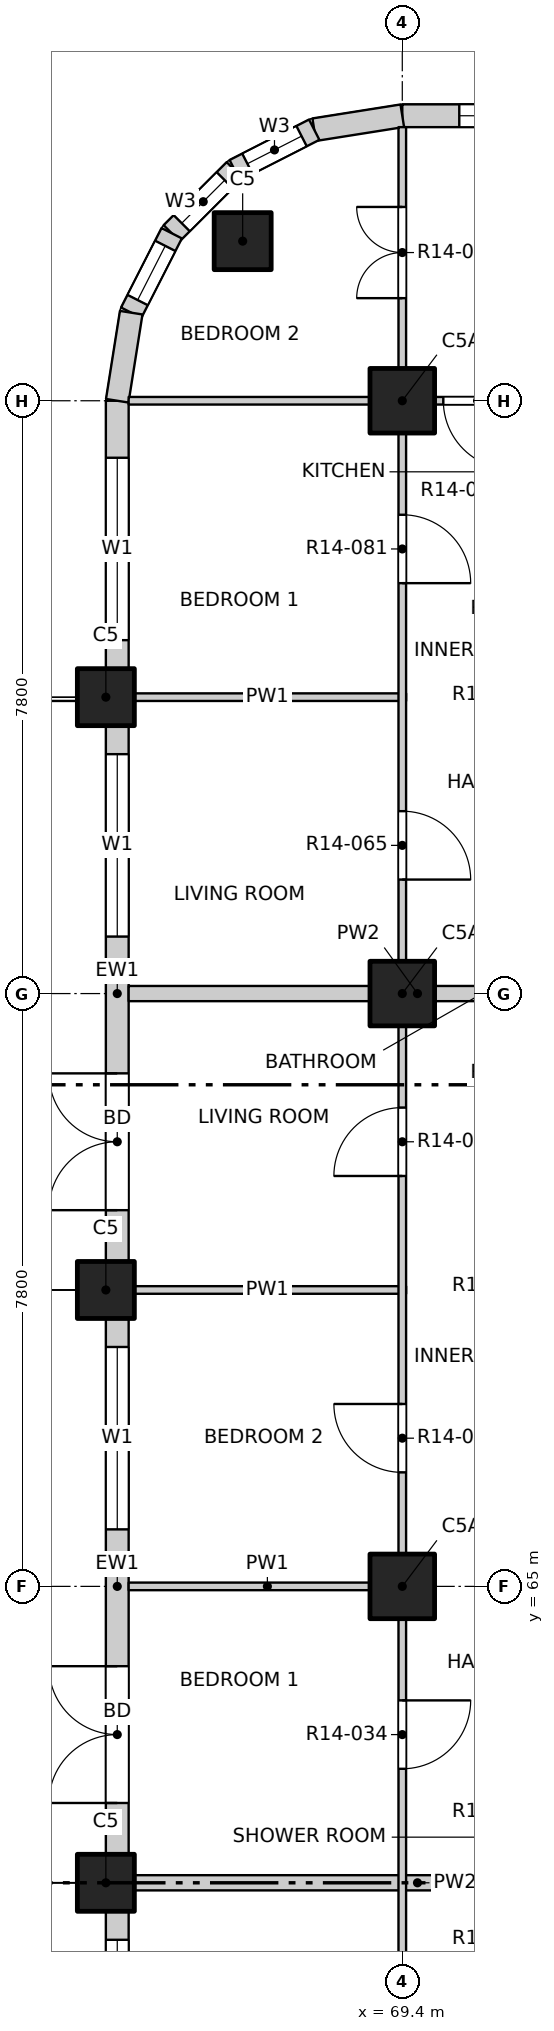
"""IFC4 building model, lengths in metres.
Left out: names, types, materials, properties, quantities, classifications, styles, units other than length and angle.
Written with IfcOpenShell. Run it as: python <this file> out.ifc"""

import sys

from ifc_helpers import new_model, si_unit, direction, frame, frame_2d, origin, origin_2d, place, context, subcontext, project, spatial, rectangle, extrude, element, fill, save


model = new_model("IFC4")
c1 = context("Model", 3, precision=1e-05, world=origin(), true_north=direction((0.0, 1.0)))
c2 = subcontext(c1, "Body", "Model", "MODEL_VIEW")
j1 = project(units=[si_unit("LENGTHUNIT", "METRE"), si_unit("PLANEANGLEUNIT", "RADIAN")], contexts=[c1])
p1 = place(None, origin())
s1 = spatial("IfcSite", under=j1, at=p1, CompositionType="ELEMENT")
p2 = place(p1, origin())
s2 = spatial("IfcBuilding", under=s1, at=p2, CompositionType="ELEMENT")
p3 = place(p2, frame((0.0, 0.0, 148.6)))
s3 = spatial("IfcBuildingStorey", under=s2, at=p3, CompositionType="ELEMENT", Elevation=148.6)
for number, where, z_axis, x_axis in (
    (1, (67.3, 82.7, -0.3), (0.0, 0.0, 1.0), (1.0, 0.0, 0.0)),
    (2, (65.5, 61.1, -0.3), (0.0, 0.0, 1.0), (1.0, 0.0, 0.0)),
    (3, (65.5, 68.9, -0.3), (0.0, 0.0, 1.0), (1.0, 0.0, 0.0)),
    (4, (65.5, 76.7, -0.3), (0.0, 0.0, 1.0), (1.0, 0.0, 0.0)),
):
    element("IfcColumn", number, at=place(p3, frame(where, z_axis=z_axis, x_axis=x_axis)), inside=s3, PredefinedType="COLUMN", context=c2, shape_type="SweptSolid", body=[
        extrude(rectangle(XDim=0.75, YDim=0.75, at=origin_2d()), origin(), (0.0, 0.0, 1.0), 3.45),
    ])
for number, where, z_axis, x_axis in (
    (5, (69.4, 65.0, -0.3), (0.0, 0.0, 1.0), (1.0, 0.0, 0.0)),
    (6, (69.4, 72.8, -0.3), (0.0, 0.0, 1.0), (1.0, 0.0, 0.0)),
    (7, (69.4, 80.6, -0.3), (0.0, 0.0, 1.0), (1.0, 0.0, 0.0)),
):
    element("IfcColumn", number, at=place(p3, frame(where, z_axis=z_axis, x_axis=x_axis)), inside=s3, PredefinedType="COLUMN", context=c2, shape_type="SweptSolid", body=[
        extrude(rectangle(XDim=0.85, YDim=0.85, at=origin_2d()), origin(), (0.0, 0.0, 1.0), 3.45),
    ])
p4 = place(p3, frame((69.4, 84.35, 0.0), z_axis=(0.0, 0.0, 1.0), x_axis=(1.0, 0.0, 0.0)))
e8 = element("IfcWall", 8, at=p4, inside=s3, PredefinedType="SOLIDWALL", context=c2, shape_type="SweptSolid", body=[
    extrude(rectangle(XDim=3.525, YDim=0.3, at=frame_2d((1.763, 0.0))), origin(), (0.0, 0.0, 1.0), 2.7),
])
p5 = place(p4, frame((0.75, 0.0, 0.9)))
e9 = element("IfcOpeningElement", 9, at=p5, cuts=e8, PredefinedType="OPENING", context=c2, shape_type="SweptSolid", body=[
    extrude(rectangle(XDim=2.4, YDim=1.8, at=frame_2d((1.2, 0.9))), frame((0.0, 0.16, 0.0), z_axis=(0.0, -1.0, 0.0), x_axis=(1.0, 0.0, 0.0)), (0.0, 0.0, 1.0), 0.32),
])
p6 = place(p3, frame((65.65, 53.675, 0.0), z_axis=(0.0, 0.0, 1.0), x_axis=(0.0, 1.0, 0.0)))
e10 = element("IfcWall", 10, at=p6, inside=s3, PredefinedType="SOLIDWALL", context=c2, shape_type="SweptSolid", body=[
    extrude(rectangle(XDim=7.05, YDim=0.3, at=frame_2d((3.525, 0.0))), origin(), (0.0, 0.0, 1.0), 2.7),
])
p7 = place(p6, frame((0.675, 0.0, 0.0)))
e11 = element("IfcOpeningElement", 11, at=p7, cuts=e10, PredefinedType="OPENING", context=c2, shape_type="SweptSolid", body=[
    extrude(rectangle(XDim=1.8, YDim=2.4, at=frame_2d((0.9, 1.2))), frame((0.0, 0.16, 0.0), z_axis=(0.0, -1.0, 0.0), x_axis=(1.0, 0.0, 0.0)), (0.0, 0.0, 1.0), 0.32),
])
p8 = place(p6, frame((4.275, 0.0, 0.9)))
e12 = element("IfcOpeningElement", 12, at=p8, cuts=e10, PredefinedType="OPENING", context=c2, shape_type="SweptSolid", body=[
    extrude(rectangle(XDim=2.4, YDim=1.8, at=frame_2d((1.2, 0.9))), frame((0.0, 0.16, 0.0), z_axis=(0.0, -1.0, 0.0), x_axis=(1.0, 0.0, 0.0)), (0.0, 0.0, 1.0), 0.32),
])
p9 = place(p3, frame((65.65, 61.475, 0.0), z_axis=(0.0, 0.0, 1.0), x_axis=(0.0, 1.0, 0.0)))
e13 = element("IfcWall", 13, at=p9, inside=s3, PredefinedType="SOLIDWALL", context=c2, shape_type="SweptSolid", body=[
    extrude(rectangle(XDim=7.05, YDim=0.3, at=frame_2d((3.525, 0.0))), origin(), (0.0, 0.0, 1.0), 2.7),
])
p10 = place(p9, frame((0.675, 0.0, 0.0)))
e14 = element("IfcOpeningElement", 14, at=p10, cuts=e13, PredefinedType="OPENING", context=c2, shape_type="SweptSolid", body=[
    extrude(rectangle(XDim=1.8, YDim=2.4, at=frame_2d((0.9, 1.2))), frame((0.0, 0.16, 0.0), z_axis=(0.0, -1.0, 0.0), x_axis=(1.0, 0.0, 0.0)), (0.0, 0.0, 1.0), 0.32),
])
p11 = place(p9, frame((4.275, 0.0, 0.9)))
e15 = element("IfcOpeningElement", 15, at=p11, cuts=e13, PredefinedType="OPENING", context=c2, shape_type="SweptSolid", body=[
    extrude(rectangle(XDim=2.4, YDim=1.8, at=frame_2d((1.2, 0.9))), frame((0.0, 0.16, 0.0), z_axis=(0.0, -1.0, 0.0), x_axis=(1.0, 0.0, 0.0)), (0.0, 0.0, 1.0), 0.32),
])
p12 = place(p3, frame((65.65, 69.275, 0.0), z_axis=(0.0, 0.0, 1.0), x_axis=(0.0, 1.0, 0.0)))
e16 = element("IfcWall", 16, at=p12, inside=s3, PredefinedType="SOLIDWALL", context=c2, shape_type="SweptSolid", body=[
    extrude(rectangle(XDim=7.05, YDim=0.3, at=frame_2d((3.525, 0.0))), origin(), (0.0, 0.0, 1.0), 2.7),
])
p13 = place(p12, frame((0.675, 0.0, 0.0)))
e17 = element("IfcOpeningElement", 17, at=p13, cuts=e16, PredefinedType="OPENING", context=c2, shape_type="SweptSolid", body=[
    extrude(rectangle(XDim=1.8, YDim=2.4, at=frame_2d((0.9, 1.2))), frame((0.0, 0.16, 0.0), z_axis=(0.0, -1.0, 0.0), x_axis=(1.0, 0.0, 0.0)), (0.0, 0.0, 1.0), 0.32),
])
p14 = place(p12, frame((4.275, 0.0, 0.9)))
e18 = element("IfcOpeningElement", 18, at=p14, cuts=e16, PredefinedType="OPENING", context=c2, shape_type="SweptSolid", body=[
    extrude(rectangle(XDim=2.4, YDim=1.8, at=frame_2d((1.2, 0.9))), frame((0.0, 0.16, 0.0), z_axis=(0.0, -1.0, 0.0), x_axis=(1.0, 0.0, 0.0)), (0.0, 0.0, 1.0), 0.32),
])
p15 = place(p3, frame((65.65, 77.075, 0.0), z_axis=(0.0, 0.0, 1.0), x_axis=(0.0, 1.0, 0.0)))
e19 = element("IfcWall", 19, at=p15, inside=s3, PredefinedType="SOLIDWALL", context=c2, shape_type="SweptSolid", body=[
    extrude(rectangle(XDim=3.525, YDim=0.3, at=frame_2d((1.763, 0.0))), origin(), (0.0, 0.0, 1.0), 2.7),
])
p16 = place(p15, frame((0.375, 0.0, 0.9)))
e20 = element("IfcOpeningElement", 20, at=p16, cuts=e19, PredefinedType="OPENING", context=c2, shape_type="SweptSolid", body=[
    extrude(rectangle(XDim=2.4, YDim=1.8, at=frame_2d((1.2, 0.9))), frame((0.0, 0.16, 0.0), z_axis=(0.0, -1.0, 0.0), x_axis=(1.0, 0.0, 0.0)), (0.0, 0.0, 1.0), 0.32),
])
p17 = place(p3, frame((69.4, 84.35, 0.0), z_axis=(0.0, 0.0, 1.0), x_axis=(-0.987678452879, -0.156496880861, 0.0)))
e21 = element("IfcWall", 21, at=p17, inside=s3, PredefinedType="SOLIDWALL", context=c2, shape_type="SweptSolid", body=[
    extrude(rectangle(XDim=1.173, YDim=0.3, at=frame_2d((0.586, 0.0))), origin(), (0.0, 0.0, 1.0), 2.7),
])
p18 = place(p3, frame((68.241, 84.167, 0.0), z_axis=(0.0, 0.0, 1.0), x_axis=(-0.890988677504, -0.454025524128, 0.0)))
e22 = element("IfcWall", 22, at=p18, inside=s3, PredefinedType="SOLIDWALL", context=c2, shape_type="SweptSolid", body=[
    extrude(rectangle(XDim=1.173, YDim=0.3, at=frame_2d((0.587, 0.0))), origin(), (0.0, 0.0, 1.0), 2.7),
])
p19 = place(p18, frame((0.187, 0.0, 0.9)))
e23 = element("IfcOpeningElement", 23, at=p19, cuts=e22, PredefinedType="OPENING", context=c2, shape_type="SweptSolid", body=[
    extrude(rectangle(XDim=0.8, YDim=1.2, at=frame_2d((0.4, 0.6))), frame((0.0, 0.16, 0.0), z_axis=(0.0, -1.0, 0.0), x_axis=(1.0, 0.0, 0.0)), (0.0, 0.0, 1.0), 0.32),
])
p20 = place(p3, frame((67.196, 83.634, 0.0), z_axis=(0.0, 0.0, 1.0), x_axis=(-0.707106781187, -0.707106781187, 0.0)))
e24 = element("IfcWall", 24, at=p20, inside=s3, PredefinedType="SOLIDWALL", context=c2, shape_type="SweptSolid", body=[
    extrude(rectangle(XDim=1.173, YDim=0.3, at=frame_2d((0.586, 0.0))), origin(), (0.0, 0.0, 1.0), 2.7),
])
p21 = place(p20, frame((0.187, 0.0, 0.9)))
e25 = element("IfcOpeningElement", 25, at=p21, cuts=e24, PredefinedType="OPENING", context=c2, shape_type="SweptSolid", body=[
    extrude(rectangle(XDim=0.8, YDim=1.2, at=frame_2d((0.4, 0.6))), frame((0.0, 0.16, 0.0), z_axis=(0.0, -1.0, 0.0), x_axis=(1.0, 0.0, 0.0)), (0.0, 0.0, 1.0), 0.32),
])
p22 = place(p3, frame((66.366, 82.804, 0.0), z_axis=(0.0, 0.0, 1.0), x_axis=(-0.454025524128, -0.890988677504, 0.0)))
e26 = element("IfcWall", 26, at=p22, inside=s3, PredefinedType="SOLIDWALL", context=c2, shape_type="SweptSolid", body=[
    extrude(rectangle(XDim=1.173, YDim=0.3, at=frame_2d((0.587, 0.0))), origin(), (0.0, 0.0, 1.0), 2.7),
])
p23 = place(p22, frame((0.187, 0.0, 0.9)))
e27 = element("IfcOpeningElement", 27, at=p23, cuts=e26, PredefinedType="OPENING", context=c2, shape_type="SweptSolid", body=[
    extrude(rectangle(XDim=0.8, YDim=1.2, at=frame_2d((0.4, 0.6))), frame((0.0, 0.16, 0.0), z_axis=(0.0, -1.0, 0.0), x_axis=(1.0, 0.0, 0.0)), (0.0, 0.0, 1.0), 0.32),
])
p24 = place(p3, frame((65.833, 81.759, 0.0), z_axis=(0.0, 0.0, 1.0), x_axis=(-0.156496880861, -0.987678452879, 0.0)))
e28 = element("IfcWall", 28, at=p24, inside=s3, PredefinedType="SOLIDWALL", context=c2, shape_type="SweptSolid", body=[
    extrude(rectangle(XDim=1.173, YDim=0.3, at=frame_2d((0.586, 0.0))), origin(), (0.0, 0.0, 1.0), 2.7),
])
p25 = place(p3, frame((65.8, 61.1, 0.0), z_axis=(0.0, 0.0, 1.0), x_axis=(1.0, 0.0, 0.0)))
e29 = element("IfcWall", 29, at=p25, inside=s3, PredefinedType="PARTITIONING", context=c2, shape_type="SweptSolid", body=[
    extrude(rectangle(XDim=7.6, YDim=0.2, at=frame_2d((3.8, 0.0))), origin(), (0.0, 0.0, 1.0), 2.55),
])
p26 = place(p3, frame((65.8, 65.0, 0.0), z_axis=(0.0, 0.0, 1.0), x_axis=(1.0, 0.0, 0.0)))
e30 = element("IfcWall", 30, at=p26, inside=s3, PredefinedType="PARTITIONING", context=c2, shape_type="SweptSolid", body=[
    extrude(rectangle(XDim=3.65, YDim=0.1, at=frame_2d((1.825, 0.0))), origin(), (0.0, 0.0, 1.0), 3.15),
])
p27 = place(p3, frame((65.8, 68.9, 0.0), z_axis=(0.0, 0.0, 1.0), x_axis=(1.0, 0.0, 0.0)))
e31 = element("IfcWall", 31, at=p27, inside=s3, PredefinedType="PARTITIONING", context=c2, shape_type="SweptSolid", body=[
    extrude(rectangle(XDim=3.65, YDim=0.1, at=frame_2d((1.825, 0.0))), origin(), (0.0, 0.0, 1.0), 2.55),
])
p28 = place(p3, frame((65.8, 72.8, 0.0), z_axis=(0.0, 0.0, 1.0), x_axis=(1.0, 0.0, 0.0)))
e32 = element("IfcWall", 32, at=p28, inside=s3, PredefinedType="PARTITIONING", context=c2, shape_type="SweptSolid", body=[
    extrude(rectangle(XDim=7.6, YDim=0.2, at=frame_2d((3.8, 0.0))), origin(), (0.0, 0.0, 1.0), 3.15),
])
p29 = place(p3, frame((65.8, 76.7, 0.0), z_axis=(0.0, 0.0, 1.0), x_axis=(1.0, 0.0, 0.0)))
e33 = element("IfcWall", 33, at=p29, inside=s3, PredefinedType="PARTITIONING", context=c2, shape_type="SweptSolid", body=[
    extrude(rectangle(XDim=3.65, YDim=0.1, at=frame_2d((1.825, 0.0))), origin(), (0.0, 0.0, 1.0), 2.55),
])
p30 = place(p3, frame((65.8, 80.6, 0.0), z_axis=(0.0, 0.0, 1.0), x_axis=(1.0, 0.0, 0.0)))
e34 = element("IfcWall", 34, at=p30, inside=s3, PredefinedType="PARTITIONING", context=c2, shape_type="SweptSolid", body=[
    extrude(rectangle(XDim=7.6, YDim=0.1, at=frame_2d((3.8, 0.0))), origin(), (0.0, 0.0, 1.0), 3.15),
])
p31 = place(p30, frame((4.14, 0.0, 0.0)))
e35 = element("IfcOpeningElement", 35, at=p31, cuts=e34, PredefinedType="OPENING", context=c2, shape_type="SweptSolid", body=[
    extrude(rectangle(XDim=0.9, YDim=2.1, at=frame_2d((0.45, 1.05))), frame((0.0, 0.06, 0.0), z_axis=(0.0, -1.0, 0.0), x_axis=(1.0, 0.0, 0.0)), (0.0, 0.0, 1.0), 0.12),
])
p32 = place(p3, frame((69.4, 45.8, 0.0), z_axis=(0.0, 0.0, 1.0), x_axis=(0.0, 1.0, 0.0)))
e36 = element("IfcWall", 36, at=p32, inside=s3, PredefinedType="PARTITIONING", context=c2, shape_type="SweptSolid", body=[
    extrude(rectangle(XDim=38.4, YDim=0.1, at=frame_2d((19.2, 0.0))), origin(), (0.0, 0.0, 1.0), 3.15),
])
p33 = place(p32, frame((1.05, 0.0, 0.0)))
e37 = element("IfcOpeningElement", 37, at=p33, cuts=e36, PredefinedType="OPENING", context=c2, shape_type="SweptSolid", body=[
    extrude(rectangle(XDim=1.2, YDim=2.1, at=frame_2d((0.6, 1.05))), frame((0.0, 0.06, 0.0), z_axis=(0.0, -1.0, 0.0), x_axis=(1.0, 0.0, 0.0)), (0.0, 0.0, 1.0), 0.12),
])
p34 = place(p32, frame((6.9, 0.0, 0.0)))
e38 = element("IfcOpeningElement", 38, at=p34, cuts=e36, PredefinedType="OPENING", context=c2, shape_type="SweptSolid", body=[
    extrude(rectangle(XDim=1.2, YDim=2.1, at=frame_2d((0.6, 1.05))), frame((0.0, 0.06, 0.0), z_axis=(0.0, -1.0, 0.0), x_axis=(1.0, 0.0, 0.0)), (0.0, 0.0, 1.0), 0.12),
])
p35 = place(p32, frame((12.9, 0.0, 0.0)))
e39 = element("IfcOpeningElement", 39, at=p35, cuts=e36, PredefinedType="OPENING", context=c2, shape_type="SweptSolid", body=[
    extrude(rectangle(XDim=0.9, YDim=2.1, at=frame_2d((0.45, 1.05))), frame((0.0, 0.06, 0.0), z_axis=(0.0, -1.0, 0.0), x_axis=(1.0, 0.0, 0.0)), (0.0, 0.0, 1.0), 0.12),
])
p36 = place(p32, frame((16.8, 0.0, 0.0)))
e40 = element("IfcOpeningElement", 40, at=p36, cuts=e36, PredefinedType="OPENING", context=c2, shape_type="SweptSolid", body=[
    extrude(rectangle(XDim=0.9, YDim=2.1, at=frame_2d((0.45, 1.05))), frame((0.0, 0.06, 0.0), z_axis=(0.0, -1.0, 0.0), x_axis=(1.0, 0.0, 0.0)), (0.0, 0.0, 1.0), 0.12),
])
p37 = place(p32, frame((20.7, 0.0, 0.0)))
e41 = element("IfcOpeningElement", 41, at=p37, cuts=e36, PredefinedType="OPENING", context=c2, shape_type="SweptSolid", body=[
    extrude(rectangle(XDim=0.9, YDim=2.1, at=frame_2d((0.45, 1.05))), frame((0.0, 0.06, 0.0), z_axis=(0.0, -1.0, 0.0), x_axis=(1.0, 0.0, 0.0)), (0.0, 0.0, 1.0), 0.12),
])
p38 = place(p32, frame((24.6, 0.0, 0.0)))
e42 = element("IfcOpeningElement", 42, at=p38, cuts=e36, PredefinedType="OPENING", context=c2, shape_type="SweptSolid", body=[
    extrude(rectangle(XDim=0.9, YDim=2.1, at=frame_2d((0.45, 1.05))), frame((0.0, 0.06, 0.0), z_axis=(0.0, -1.0, 0.0), x_axis=(1.0, 0.0, 0.0)), (0.0, 0.0, 1.0), 0.12),
])
p39 = place(p32, frame((28.5, 0.0, 0.0)))
e43 = element("IfcOpeningElement", 43, at=p39, cuts=e36, PredefinedType="OPENING", context=c2, shape_type="SweptSolid", body=[
    extrude(rectangle(XDim=0.9, YDim=2.1, at=frame_2d((0.45, 1.05))), frame((0.0, 0.06, 0.0), z_axis=(0.0, -1.0, 0.0), x_axis=(1.0, 0.0, 0.0)), (0.0, 0.0, 1.0), 0.12),
])
p40 = place(p32, frame((32.4, 0.0, 0.0)))
e44 = element("IfcOpeningElement", 44, at=p40, cuts=e36, PredefinedType="OPENING", context=c2, shape_type="SweptSolid", body=[
    extrude(rectangle(XDim=0.9, YDim=2.1, at=frame_2d((0.45, 1.05))), frame((0.0, 0.06, 0.0), z_axis=(0.0, -1.0, 0.0), x_axis=(1.0, 0.0, 0.0)), (0.0, 0.0, 1.0), 0.12),
])
p41 = place(p32, frame((36.15, 0.0, 0.0)))
e45 = element("IfcOpeningElement", 45, at=p41, cuts=e36, PredefinedType="OPENING", context=c2, shape_type="SweptSolid", body=[
    extrude(rectangle(XDim=1.2, YDim=2.1, at=frame_2d((0.6, 1.05))), frame((0.0, 0.06, 0.0), z_axis=(0.0, -1.0, 0.0), x_axis=(1.0, 0.0, 0.0)), (0.0, 0.0, 1.0), 0.12),
])
p42 = place(p5, origin())
e46 = element("IfcWindow", 46, at=p42, inside=s3, PartitioningType="DOUBLE_PANEL_VERTICAL", PredefinedType="WINDOW", context=c2, shape_type="SweptSolid", body=[
    extrude(rectangle(XDim=2.4, YDim=1.8, at=frame_2d((1.2, 0.9))), frame((0.0, 0.03, 0.0), z_axis=(0.0, -1.0, 0.0), x_axis=(1.0, 0.0, 0.0)), (0.0, 0.0, 1.0), 0.06),
])
fill(e9, e46)
p43 = place(p8, origin())
e47 = element("IfcWindow", 47, at=p43, inside=s3, PartitioningType="DOUBLE_PANEL_VERTICAL", PredefinedType="WINDOW", context=c2, shape_type="SweptSolid", body=[
    extrude(rectangle(XDim=2.4, YDim=1.8, at=frame_2d((1.2, 0.9))), frame((0.0, 0.03, 0.0), z_axis=(0.0, -1.0, 0.0), x_axis=(1.0, 0.0, 0.0)), (0.0, 0.0, 1.0), 0.06),
])
fill(e12, e47)
p44 = place(p10, origin())
e48 = element("IfcDoor", 48, at=p44, inside=s3, OperationType="DOUBLE_DOOR_SINGLE_SWING", PredefinedType="DOOR", context=c2, shape_type="SweptSolid", body=[
    extrude(rectangle(XDim=1.8, YDim=2.4, at=frame_2d((0.9, 1.2))), frame((0.0, 0.025, 0.0), z_axis=(0.0, -1.0, 0.0), x_axis=(1.0, 0.0, 0.0)), (0.0, 0.0, 1.0), 0.05),
])
fill(e14, e48)
p45 = place(p11, origin())
e49 = element("IfcWindow", 49, at=p45, inside=s3, PartitioningType="DOUBLE_PANEL_VERTICAL", PredefinedType="WINDOW", context=c2, shape_type="SweptSolid", body=[
    extrude(rectangle(XDim=2.4, YDim=1.8, at=frame_2d((1.2, 0.9))), frame((0.0, 0.03, 0.0), z_axis=(0.0, -1.0, 0.0), x_axis=(1.0, 0.0, 0.0)), (0.0, 0.0, 1.0), 0.06),
])
fill(e15, e49)
p46 = place(p13, origin())
e50 = element("IfcDoor", 50, at=p46, inside=s3, OperationType="DOUBLE_DOOR_SINGLE_SWING", PredefinedType="DOOR", context=c2, shape_type="SweptSolid", body=[
    extrude(rectangle(XDim=1.8, YDim=2.4, at=frame_2d((0.9, 1.2))), frame((0.0, 0.025, 0.0), z_axis=(0.0, -1.0, 0.0), x_axis=(1.0, 0.0, 0.0)), (0.0, 0.0, 1.0), 0.05),
])
fill(e17, e50)
p47 = place(p14, origin())
e51 = element("IfcWindow", 51, at=p47, inside=s3, PartitioningType="DOUBLE_PANEL_VERTICAL", PredefinedType="WINDOW", context=c2, shape_type="SweptSolid", body=[
    extrude(rectangle(XDim=2.4, YDim=1.8, at=frame_2d((1.2, 0.9))), frame((0.0, 0.03, 0.0), z_axis=(0.0, -1.0, 0.0), x_axis=(1.0, 0.0, 0.0)), (0.0, 0.0, 1.0), 0.06),
])
fill(e18, e51)
p48 = place(p16, origin())
e52 = element("IfcWindow", 52, at=p48, inside=s3, PartitioningType="DOUBLE_PANEL_VERTICAL", PredefinedType="WINDOW", context=c2, shape_type="SweptSolid", body=[
    extrude(rectangle(XDim=2.4, YDim=1.8, at=frame_2d((1.2, 0.9))), frame((0.0, 0.03, 0.0), z_axis=(0.0, -1.0, 0.0), x_axis=(1.0, 0.0, 0.0)), (0.0, 0.0, 1.0), 0.06),
])
fill(e20, e52)
p49 = place(p19, origin())
e53 = element("IfcWindow", 53, at=p49, inside=s3, PartitioningType="SINGLE_PANEL", PredefinedType="WINDOW", context=c2, shape_type="SweptSolid", body=[
    extrude(rectangle(XDim=0.8, YDim=1.2, at=frame_2d((0.4, 0.6))), frame((0.0, 0.03, 0.0), z_axis=(0.0, -1.0, 0.0), x_axis=(1.0, 0.0, 0.0)), (0.0, 0.0, 1.0), 0.06),
])
fill(e23, e53)
p50 = place(p21, origin())
e54 = element("IfcWindow", 54, at=p50, inside=s3, PartitioningType="SINGLE_PANEL", PredefinedType="WINDOW", context=c2, shape_type="SweptSolid", body=[
    extrude(rectangle(XDim=0.8, YDim=1.2, at=frame_2d((0.4, 0.6))), frame((0.0, 0.03, 0.0), z_axis=(0.0, -1.0, 0.0), x_axis=(1.0, 0.0, 0.0)), (0.0, 0.0, 1.0), 0.06),
])
fill(e25, e54)
p51 = place(p23, origin())
e55 = element("IfcWindow", 55, at=p51, inside=s3, PartitioningType="SINGLE_PANEL", PredefinedType="WINDOW", context=c2, shape_type="SweptSolid", body=[
    extrude(rectangle(XDim=0.8, YDim=1.2, at=frame_2d((0.4, 0.6))), frame((0.0, 0.03, 0.0), z_axis=(0.0, -1.0, 0.0), x_axis=(1.0, 0.0, 0.0)), (0.0, 0.0, 1.0), 0.06),
])
fill(e27, e55)
p52 = place(p36, origin())
e56 = element("IfcDoor", 56, at=p52, inside=s3, OperationType="SINGLE_SWING_LEFT", PredefinedType="DOOR", context=c2, shape_type="SweptSolid", body=[
    extrude(rectangle(XDim=0.9, YDim=2.1, at=frame_2d((0.45, 1.05))), frame((0.0, 0.025, 0.0), z_axis=(0.0, -1.0, 0.0), x_axis=(1.0, 0.0, 0.0)), (0.0, 0.0, 1.0), 0.05),
])
fill(e40, e56)
p53 = place(p37, origin())
e57 = element("IfcDoor", 57, at=p53, inside=s3, OperationType="SINGLE_SWING_RIGHT", PredefinedType="DOOR", context=c2, shape_type="SweptSolid", body=[
    extrude(rectangle(XDim=0.9, YDim=2.1, at=frame_2d((0.45, 1.05))), frame((0.0, 0.025, 0.0), z_axis=(0.0, -1.0, 0.0), x_axis=(1.0, 0.0, 0.0)), (0.0, 0.0, 1.0), 0.05),
])
fill(e41, e57)
p54 = place(p38, origin())
e58 = element("IfcDoor", 58, at=p54, inside=s3, OperationType="SINGLE_SWING_LEFT", PredefinedType="DOOR", context=c2, shape_type="SweptSolid", body=[
    extrude(rectangle(XDim=0.9, YDim=2.1, at=frame_2d((0.45, 1.05))), frame((0.0, 0.025, 0.0), z_axis=(0.0, -1.0, 0.0), x_axis=(1.0, 0.0, 0.0)), (0.0, 0.0, 1.0), 0.05),
])
fill(e42, e58)
p55 = place(p39, origin())
e59 = element("IfcDoor", 59, at=p55, inside=s3, OperationType="SINGLE_SWING_RIGHT", PredefinedType="DOOR", context=c2, shape_type="SweptSolid", body=[
    extrude(rectangle(XDim=0.9, YDim=2.1, at=frame_2d((0.45, 1.05))), frame((0.0, 0.025, 0.0), z_axis=(0.0, -1.0, 0.0), x_axis=(1.0, 0.0, 0.0)), (0.0, 0.0, 1.0), 0.05),
])
fill(e43, e59)
p56 = place(p40, origin())
e60 = element("IfcDoor", 60, at=p56, inside=s3, OperationType="SINGLE_SWING_RIGHT", PredefinedType="DOOR", context=c2, shape_type="SweptSolid", body=[
    extrude(rectangle(XDim=0.9, YDim=2.1, at=frame_2d((0.45, 1.05))), frame((0.0, 0.025, 0.0), z_axis=(0.0, -1.0, 0.0), x_axis=(1.0, 0.0, 0.0)), (0.0, 0.0, 1.0), 0.05),
])
fill(e44, e60)
p57 = place(p31, origin())
e61 = element("IfcDoor", 61, at=p57, inside=s3, OperationType="SINGLE_SWING_LEFT", PredefinedType="DOOR", context=c2, shape_type="SweptSolid", body=[
    extrude(rectangle(XDim=0.9, YDim=2.1, at=frame_2d((0.45, 1.05))), frame((0.0, 0.025, 0.0), z_axis=(0.0, -1.0, 0.0), x_axis=(1.0, 0.0, 0.0)), (0.0, 0.0, 1.0), 0.05),
])
fill(e35, e61)
p58 = place(p41, origin())
e62 = element("IfcDoor", 62, at=p58, inside=s3, OperationType="DOUBLE_DOOR_SINGLE_SWING", PredefinedType="DOOR", context=c2, shape_type="SweptSolid", body=[
    extrude(rectangle(XDim=1.2, YDim=2.1, at=frame_2d((0.6, 1.05))), frame((0.0, 0.025, 0.0), z_axis=(0.0, -1.0, 0.0), x_axis=(1.0, 0.0, 0.0)), (0.0, 0.0, 1.0), 0.05),
])
fill(e45, e62)
save(model, sys.argv[1])
